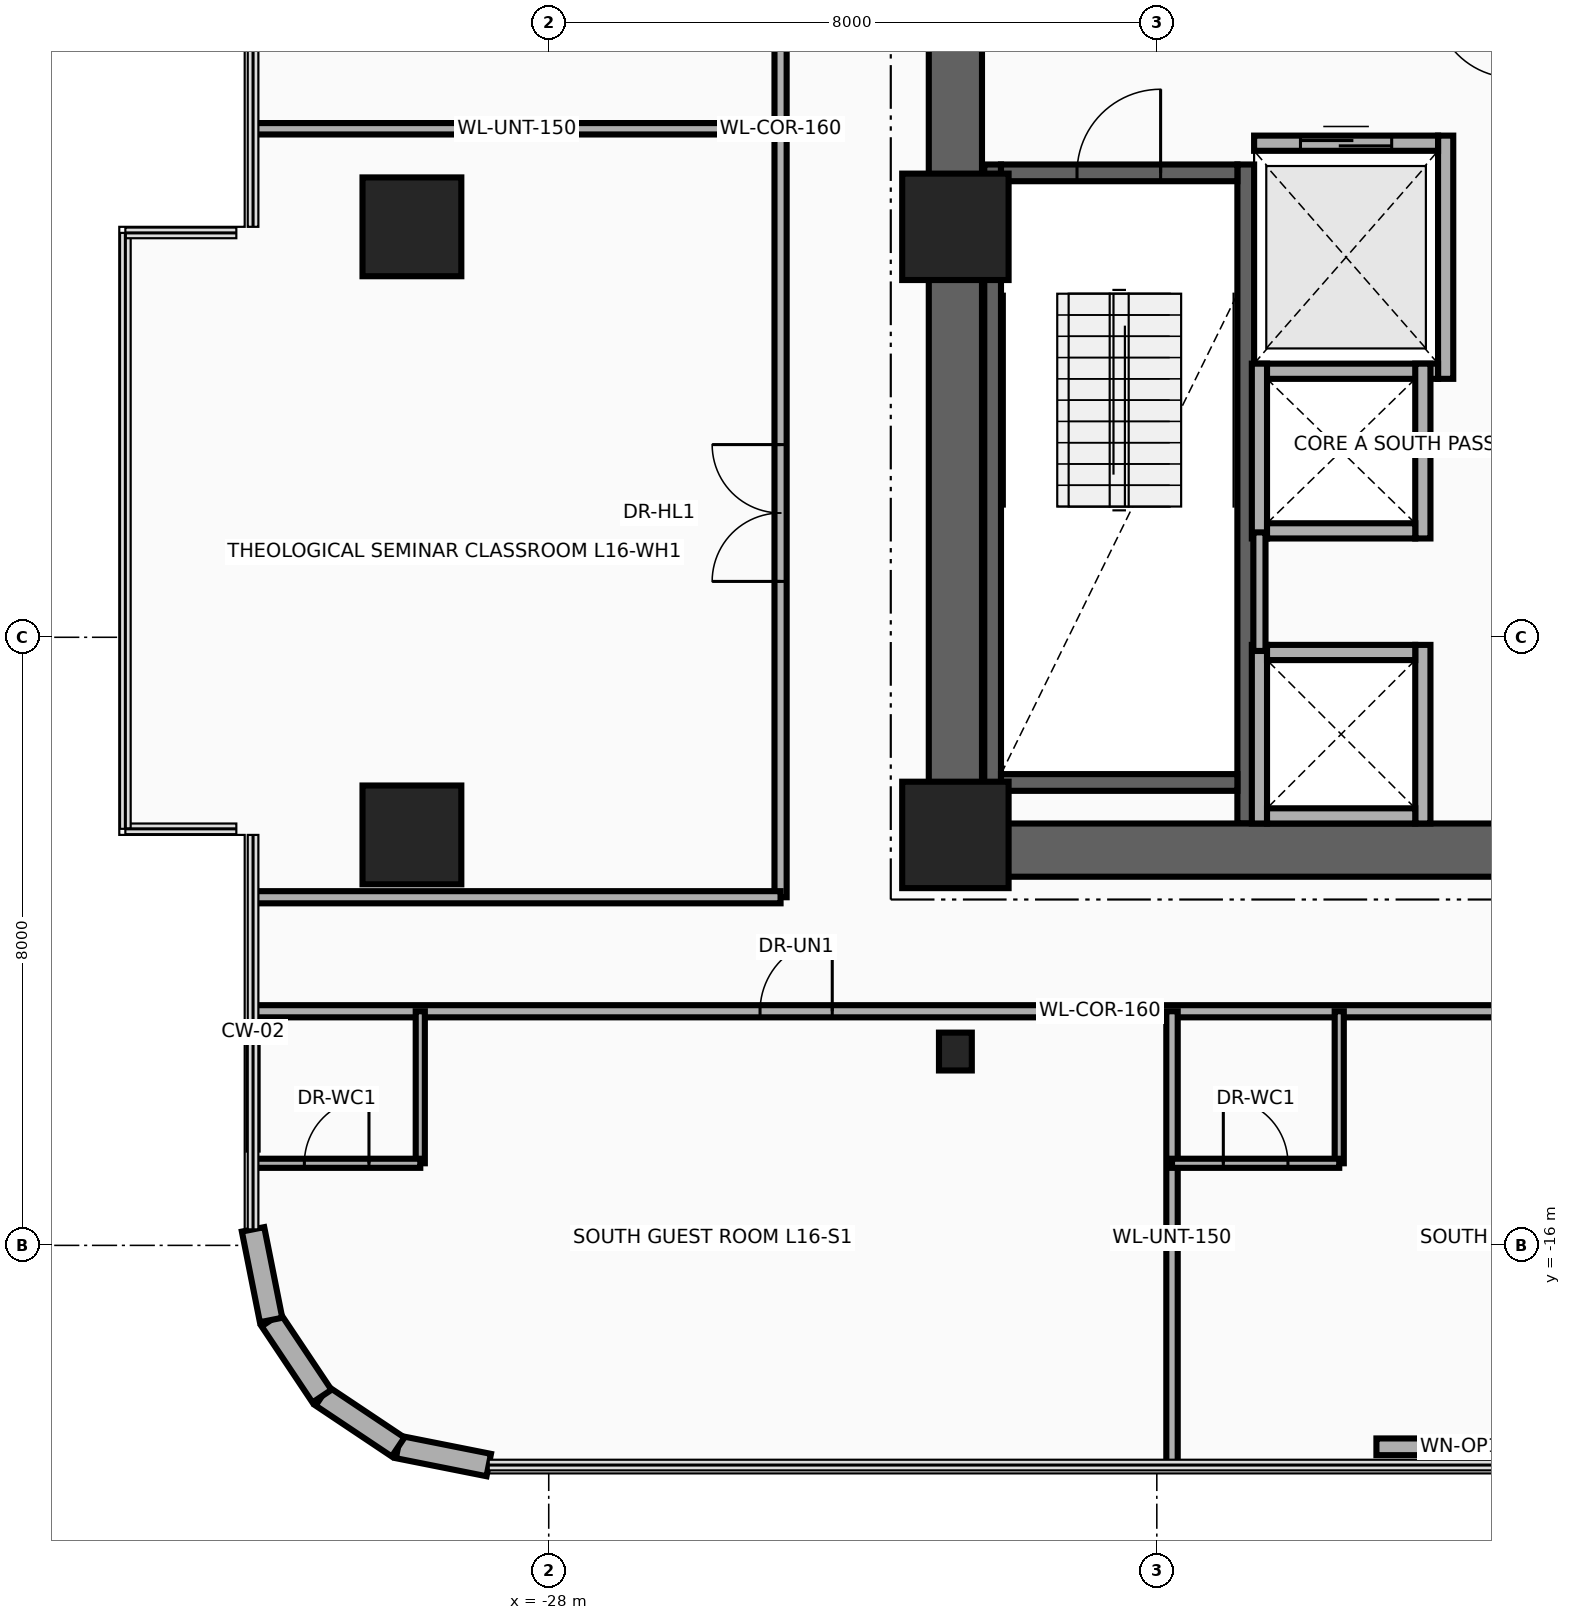
"""IFC4 building model, lengths in metres.
Left out: names, types, materials, properties, quantities, classifications, styles, units other than length and angle.
Written with IfcOpenShell. Run it as: python <this file> out.ifc"""

import sys

from ifc_helpers import new_model, si_unit, direction, frame, frame_2d, origin, origin_2d, place, context, subcontext, project, spatial, rectangle, circle, i_section, extrude, source, transform, mapped, element, fill, save


model = new_model("IFC4")
c1 = context("Model", 3, precision=1e-05, world=origin(), true_north=direction((0.0, 1.0)))
c2 = subcontext(c1, "Body", "Model", "MODEL_VIEW")
j1 = project(units=[si_unit("LENGTHUNIT", "METRE"), si_unit("PLANEANGLEUNIT", "RADIAN")], contexts=[c1])
p1 = place(None, origin())
s1 = spatial("IfcSite", under=j1, at=p1, CompositionType="ELEMENT")
p2 = place(p1, origin())
s2 = spatial("IfcBuilding", under=s1, at=p2, CompositionType="ELEMENT")
p3 = place(p2, frame((0.0, 0.0, 66.7)))
s3 = spatial("IfcBuildingStorey", under=s2, at=p3, CompositionType="ELEMENT", Elevation=66.7)
for number, where, z_axis, x_axis in (
    (1, (-22.16, -10.45, 0.0), (0.0, 0.0, 1.0), (0.0, 1.0, 0.0)),
    (2, (-18.83, -10.45, 0.0), (0.0, 0.0, 1.0), (0.0, 1.0, 0.0)),
):
    element("IfcWall", number, at=place(p3, frame(where, z_axis=z_axis, x_axis=x_axis)), inside=s3, PredefinedType="SHEAR", context=c2, shape_type="SweptSolid", body=[
        extrude(rectangle(XDim=8.67, YDim=0.22, at=frame_2d((4.335, 0.0))), origin(), (0.0, 0.0, 1.0), 3.46),
    ])
p4 = place(p3, frame((-22.05, -9.91, 0.0), z_axis=(0.0, 0.0, 1.0), x_axis=(1.0, 0.0, 0.0)))
e3 = element("IfcWall", 3, at=p4, inside=s3, PredefinedType="SHEAR", context=c2, shape_type="SweptSolid", body=[
    extrude(rectangle(XDim=3.11, YDim=0.22, at=frame_2d((1.555, 0.0))), origin(), (0.0, 0.0, 1.0), 3.46),
])
p5 = place(p3, frame((-22.05, -1.89, 0.0), z_axis=(0.0, 0.0, 1.0), x_axis=(1.0, 0.0, 0.0)))
e4 = element("IfcWall", 4, at=p5, inside=s3, PredefinedType="SHEAR", context=c2, shape_type="SweptSolid", body=[
    extrude(rectangle(XDim=3.11, YDim=0.22, at=frame_2d((1.555, 0.0))), origin(), (0.0, 0.0, 1.0), 3.46),
])
p6 = place(p5, frame((1.0, 0.0, 0.0)))
e5 = element("IfcOpeningElement", 5, at=p6, cuts=e4, PredefinedType="OPENING", context=c2, shape_type="SweptSolid", body=[
    extrude(rectangle(XDim=1.1, YDim=2.15, at=frame_2d((0.55, 1.075))), frame((0.0, 0.125, 0.0), z_axis=(0.0, -1.0, 0.0), x_axis=(1.0, 0.0, 0.0)), (0.0, 0.0, 1.0), 0.25),
])
p7 = place(p3, frame((-22.65, -11.15, 0.0), z_axis=(0.0, 0.0, 1.0), x_axis=(0.0, 1.0, 0.0)))
e6 = element("IfcWall", 6, at=p7, inside=s3, PredefinedType="SHEAR", context=c2, shape_type="SweptSolid", body=[
    extrude(rectangle(XDim=22.3, YDim=0.7, at=frame_2d((11.15, 0.0))), origin(), (0.0, 0.0, 1.0), 3.46),
])
p8 = place(p3, frame((-22.65, -10.8, 0.0), z_axis=(0.0, 0.0, 1.0), x_axis=(1.0, 0.0, 0.0)))
e7 = element("IfcWall", 7, at=p8, inside=s3, PredefinedType="SHEAR", context=c2, shape_type="SweptSolid", body=[
    extrude(rectangle(XDim=10.25, YDim=0.7, at=frame_2d((5.125, 0.0))), origin(), (0.0, 0.0, 1.0), 3.46),
])
m1 = source(origin(), c2, "Body", "SweptSolid", [
    extrude(circle(Radius=0.65, at=origin_2d()), origin(), (0.0, 0.0, 1.0), 3.7),
])
p9 = place(p3, frame((-29.8, -10.6, 0.0), z_axis=(0.0, 0.0, 1.0), x_axis=(1.0, 0.0, 0.0)))
e8 = element("IfcColumn", 8, at=p9, inside=s3, PredefinedType="COLUMN", context=c2, shape_type="MappedRepresentation", body=[
    mapped(m1, transform((0.0, 0.0, 0.0), x_axis=(1.0, 0.0, 0.0), y_axis=(0.0, 1.0, 0.0), z_axis=(0.0, 0.0, 1.0), scale=1.0)),
])
m2 = source(origin(), c2, "Body", "SweptSolid", [
    extrude(rectangle(XDim=1.4, YDim=1.4, at=origin_2d()), origin(), (0.0, 0.0, 1.0), 3.7),
])
p10 = place(p3, frame((-22.65, -10.6, 0.0), z_axis=(0.0, 0.0, 1.0), x_axis=(1.0, 0.0, 0.0)))
e9 = element("IfcColumn", 9, at=p10, inside=s3, PredefinedType="COLUMN", context=c2, shape_type="MappedRepresentation", body=[
    mapped(m2, transform((0.0, 0.0, 0.0), x_axis=(1.0, 0.0, 0.0), y_axis=(0.0, 1.0, 0.0), z_axis=(0.0, 0.0, 1.0), scale=1.0)),
])
p11 = place(p3, frame((-29.8, -2.6, 0.0), z_axis=(0.0, 0.0, 1.0), x_axis=(1.0, 0.0, 0.0)))
e10 = element("IfcColumn", 10, at=p11, inside=s3, PredefinedType="COLUMN", context=c2, shape_type="MappedRepresentation", body=[
    mapped(m1, transform((0.0, 0.0, 0.0), x_axis=(1.0, 0.0, 0.0), y_axis=(0.0, 1.0, 0.0), z_axis=(0.0, 0.0, 1.0), scale=1.0)),
])
p12 = place(p3, frame((-22.65, -2.6, 0.0), z_axis=(0.0, 0.0, 1.0), x_axis=(1.0, 0.0, 0.0)))
e11 = element("IfcColumn", 11, at=p12, inside=s3, PredefinedType="COLUMN", context=c2, shape_type="MappedRepresentation", body=[
    mapped(m2, transform((0.0, 0.0, 0.0), x_axis=(1.0, 0.0, 0.0), y_axis=(0.0, 1.0, 0.0), z_axis=(0.0, 0.0, 1.0), scale=1.0)),
])
m3 = source(origin(), c2, "Body", "SweptSolid", [
    extrude(i_section(OverallWidth=0.432, OverallDepth=0.498, WebThickness=0.056, FlangeThickness=0.089, at=origin_2d()), origin(), (0.0, 0.0, 1.0), 3.7),
])
p13 = place(p3, frame((-22.65, -13.45, 0.0), z_axis=(0.0, 0.0, 1.0), x_axis=(1.0, 0.0, 0.0)))
e12 = element("IfcColumn", 12, at=p13, inside=s3, PredefinedType="COLUMN", context=c2, shape_type="MappedRepresentation", body=[
    mapped(m3, transform((0.0, 0.0, 0.0), x_axis=(1.0, 0.0, 0.0), y_axis=(0.0, 1.0, 0.0), z_axis=(0.0, 0.0, 1.0), scale=1.0)),
])
p14 = place(p3, frame((-14.911, -18.65, 0.0), z_axis=(0.0, 0.0, 1.0), x_axis=(-1.0, 0.0, 0.0)))
e13 = element("IfcWall", 13, at=p14, inside=s3, PredefinedType="SOLIDWALL", context=c2, shape_type="SweptSolid", body=[
    extrude(rectangle(XDim=2.2, YDim=0.22, at=frame_2d((1.1, 0.0))), origin(), (0.0, 0.0, 1.0), 3.46),
])
p15 = place(p14, frame((0.65, 0.0, 0.95)))
e14 = element("IfcOpeningElement", 14, at=p15, cuts=e13, PredefinedType="OPENING", context=c2, shape_type="SweptSolid", body=[
    extrude(rectangle(XDim=0.9, YDim=1.3, at=frame_2d((0.45, 0.65))), frame((0.0, 0.125, 0.0), z_axis=(0.0, -1.0, 0.0), x_axis=(1.0, 0.0, 0.0)), (0.0, 0.0, 1.0), 0.25),
])
p16 = place(p3, frame((-28.789, -18.89, 0.0), z_axis=(0.0, 0.0, 1.0), x_axis=(-0.980804027463, 0.194996050505, 0.0)))
e15 = element("IfcWall", 15, at=p16, inside=s3, PredefinedType="SOLIDWALL", context=c2, shape_type="SweptSolid", body=[
    extrude(rectangle(XDim=1.216, YDim=0.3, at=frame_2d((0.608, 0.0))), origin(), (0.0, 0.0, 1.0), 3.46),
])
for number, where, z_axis, x_axis in (
    (16, (-29.982, -18.653, 0.0), (0.0, 0.0, 1.0), (-0.831, 0.556, 0.0)),
    (17, (-30.983, -17.983, 0.0), (0.0, 0.0, 1.0), (-0.556, 0.831, 0.0)),
):
    element("IfcWall", number, at=place(p3, frame(where, z_axis=z_axis, x_axis=x_axis)), inside=s3, PredefinedType="SOLIDWALL", context=c2, shape_type="SweptSolid", body=[
        extrude(rectangle(XDim=1.205, YDim=0.3, at=frame_2d((0.603, 0.0))), origin(), (0.0, 0.0, 1.0), 3.46),
    ])
p17 = place(p3, frame((-31.653, -16.982, 0.0), z_axis=(0.0, 0.0, 1.0), x_axis=(-0.194996050505, 0.980804027463, 0.0)))
e18 = element("IfcWall", 18, at=p17, inside=s3, PredefinedType="SOLIDWALL", context=c2, shape_type="SweptSolid", body=[
    extrude(rectangle(XDim=1.216, YDim=0.3, at=frame_2d((0.608, 0.0))), origin(), (0.0, 0.0, 1.0), 3.46),
])
p18 = place(p3, frame((-16.2, -4.6, 0.0), z_axis=(0.0, 0.0, 1.0), x_axis=(0.0, 1.0, 0.0)))
e19 = element("IfcWall", 19, at=p18, inside=s3, PredefinedType="MOVABLE", context=c2, shape_type="SweptSolid", body=[
    extrude(rectangle(XDim=3.2, YDim=0.2, at=frame_2d((1.6, 0.0))), origin(), (0.0, 0.0, 1.0), 3.46),
])
p19 = place(p3, frame((-18.72, -4.5, 0.0), z_axis=(0.0, 0.0, 1.0), x_axis=(1.0, 0.0, 0.0)))
e20 = element("IfcWall", 20, at=p19, inside=s3, PredefinedType="MOVABLE", context=c2, shape_type="SweptSolid", body=[
    extrude(rectangle(XDim=2.42, YDim=0.2, at=frame_2d((1.21, 0.0))), origin(), (0.0, 0.0, 1.0), 3.46),
])
p20 = place(p3, frame((-18.72, -1.5, 0.0), z_axis=(0.0, 0.0, 1.0), x_axis=(1.0, 0.0, 0.0)))
e21 = element("IfcWall", 21, at=p20, inside=s3, PredefinedType="MOVABLE", context=c2, shape_type="SweptSolid", body=[
    extrude(rectangle(XDim=2.42, YDim=0.2, at=frame_2d((1.21, 0.0))), origin(), (0.0, 0.0, 1.0), 3.46),
])
p21 = place(p20, frame((0.61, 0.0, 0.0)))
e22 = element("IfcOpeningElement", 22, at=p21, cuts=e21, PredefinedType="OPENING", context=c2, shape_type="SweptSolid", body=[
    extrude(rectangle(XDim=1.2, YDim=2.1, at=frame_2d((0.6, 1.05))), frame((0.0, 0.115, 0.0), z_axis=(0.0, -1.0, 0.0), x_axis=(1.0, 0.0, 0.0)), (0.0, 0.0, 1.0), 0.23),
])
for number, where, z_axis, x_axis in (
    (23, (-18.65, -10.45, 0.0), (0.0, 0.0, 1.0), (0.0, 1.0, 0.0)),
    (24, (-16.5, -10.45, 0.0), (0.0, 0.0, 1.0), (0.0, 1.0, 0.0)),
):
    element("IfcWall", number, at=place(p3, frame(where, z_axis=z_axis, x_axis=x_axis)), inside=s3, PredefinedType="MOVABLE", context=c2, shape_type="SweptSolid", body=[
        extrude(rectangle(XDim=2.35, YDim=0.2, at=frame_2d((1.175, 0.0))), origin(), (0.0, 0.0, 1.0), 2.583),
    ])
p22 = place(p3, frame((-18.55, -10.35, 0.0), z_axis=(0.0, 0.0, 1.0), x_axis=(1.0, 0.0, 0.0)))
e25 = element("IfcWall", 25, at=p22, inside=s3, PredefinedType="MOVABLE", context=c2, shape_type="SweptSolid", body=[
    extrude(rectangle(XDim=1.95, YDim=0.2, at=frame_2d((0.975, 0.0))), origin(), (0.0, 0.0, 1.0), 2.583),
])
p23 = place(p3, frame((-18.55, -8.2, 0.0), z_axis=(0.0, 0.0, 1.0), x_axis=(1.0, 0.0, 0.0)))
e26 = element("IfcWall", 26, at=p23, inside=s3, PredefinedType="MOVABLE", context=c2, shape_type="SweptSolid", body=[
    extrude(rectangle(XDim=1.95, YDim=0.2, at=frame_2d((0.975, 0.0))), origin(), (0.0, 0.0, 1.0), 3.46),
])
for number, where, z_axis, x_axis in (
    (27, (-18.65, -6.7, 0.0), (0.0, 0.0, 1.0), (0.0, 1.0, 0.0)),
    (28, (-16.5, -6.7, 0.0), (0.0, 0.0, 1.0), (0.0, 1.0, 0.0)),
):
    element("IfcWall", number, at=place(p3, frame(where, z_axis=z_axis, x_axis=x_axis)), inside=s3, PredefinedType="MOVABLE", context=c2, shape_type="SweptSolid", body=[
        extrude(rectangle(XDim=2.3, YDim=0.2, at=frame_2d((1.15, 0.0))), origin(), (0.0, 0.0, 1.0), 3.46),
    ])
p24 = place(p3, frame((-18.55, -6.6, 0.0), z_axis=(0.0, 0.0, 1.0), x_axis=(1.0, 0.0, 0.0)))
e29 = element("IfcWall", 29, at=p24, inside=s3, PredefinedType="MOVABLE", context=c2, shape_type="SweptSolid", body=[
    extrude(rectangle(XDim=1.95, YDim=0.2, at=frame_2d((0.975, 0.0))), origin(), (0.0, 0.0, 1.0), 3.46),
])
p25 = place(p3, frame((-18.65, -8.18, 0.0), z_axis=(0.0, 0.0, 1.0), x_axis=(0.0, 1.0, 0.0)))
e30 = element("IfcWall", 30, at=p25, inside=s3, PredefinedType="PARTITIONING", context=c2, shape_type="SweptSolid", body=[
    extrude(rectangle(XDim=1.56, YDim=0.16, at=frame_2d((0.78, 0.0))), origin(), (0.0, 0.0, 1.0), 3.46),
])
p26 = place(p3, frame((-24.95, -11.42, 0.0), z_axis=(0.0, 0.0, 1.0), x_axis=(0.0, 1.0, 0.0)))
e31 = element("IfcWall", 31, at=p26, inside=s3, PredefinedType="PARTITIONING", context=c2, shape_type="SweptSolid", body=[
    extrude(rectangle(XDim=20.22, YDim=0.16, at=frame_2d((10.11, 0.0))), origin(), (0.0, 0.0, 1.0), 2.583),
])
p27 = place(p26, frame((4.155, 0.0, 0.0)))
e32 = element("IfcOpeningElement", 32, at=p27, cuts=e31, PredefinedType="OPENING", context=c2, shape_type="SweptSolid", body=[
    extrude(rectangle(XDim=1.8, YDim=2.15, at=frame_2d((0.9, 1.075))), frame((0.0, 0.095, 0.0), z_axis=(0.0, -1.0, 0.0), x_axis=(1.0, 0.0, 0.0)), (0.0, 0.0, 1.0), 0.19),
])
p28 = place(p26, frame((14.265, 0.0, 0.0)))
e33 = element("IfcOpeningElement", 33, at=p28, cuts=e31, PredefinedType="OPENING", context=c2, shape_type="SweptSolid", body=[
    extrude(rectangle(XDim=1.8, YDim=2.15, at=frame_2d((0.9, 1.075))), frame((0.0, 0.095, 0.0), z_axis=(0.0, -1.0, 0.0), x_axis=(1.0, 0.0, 0.0)), (0.0, 0.0, 1.0), 0.19),
])
p29 = place(p3, frame((-31.89, -1.31, 0.0), z_axis=(0.0, 0.0, 1.0), x_axis=(1.0, 0.0, 0.0)))
e34 = element("IfcWall", 34, at=p29, inside=s3, PredefinedType="PARTITIONING", context=c2, shape_type="SweptSolid", body=[
    extrude(rectangle(XDim=6.94, YDim=0.15, at=frame_2d((3.47, 0.0))), origin(), (0.0, 0.0, 1.0), 2.896),
])
p30 = place(p3, frame((-31.89, -12.92, 0.0), z_axis=(0.0, 0.0, 1.0), x_axis=(1.0, 0.0, 0.0)))
e35 = element("IfcWall", 35, at=p30, inside=s3, PredefinedType="PARTITIONING", context=c2, shape_type="SweptSolid", body=[
    extrude(rectangle(XDim=22.28, YDim=0.16, at=frame_2d((11.14, 0.0))), origin(), (0.0, 0.0, 1.0), 2.834),
])
p31 = place(p30, frame((6.67, 0.0, 0.0)))
e36 = element("IfcOpeningElement", 36, at=p31, cuts=e35, PredefinedType="OPENING", context=c2, shape_type="SweptSolid", body=[
    extrude(rectangle(XDim=0.95, YDim=2.15, at=frame_2d((0.475, 1.075))), frame((0.0, 0.095, 0.0), z_axis=(0.0, -1.0, 0.0), x_axis=(1.0, 0.0, 0.0)), (0.0, 0.0, 1.0), 0.19),
])
p32 = place(p30, frame((17.81, 0.0, 0.0)))
e37 = element("IfcOpeningElement", 37, at=p32, cuts=e35, PredefinedType="OPENING", context=c2, shape_type="SweptSolid", body=[
    extrude(rectangle(XDim=0.95, YDim=2.15, at=frame_2d((0.475, 1.075))), frame((0.0, 0.095, 0.0), z_axis=(0.0, -1.0, 0.0), x_axis=(1.0, 0.0, 0.0)), (0.0, 0.0, 1.0), 0.19),
])
p33 = place(p3, frame((-19.8, -18.89, 0.0), z_axis=(0.0, 0.0, 1.0), x_axis=(0.0, 1.0, 0.0)))
e38 = element("IfcWall", 38, at=p33, inside=s3, PredefinedType="PARTITIONING", context=c2, shape_type="SweptSolid", body=[
    extrude(rectangle(XDim=5.97, YDim=0.15, at=frame_2d((2.985, 0.0))), origin(), (0.0, 0.0, 1.0), 2.896),
])
p34 = place(p3, frame((-29.69, -14.92, 0.0), z_axis=(0.0, 0.0, 1.0), x_axis=(0.0, 1.0, 0.0)))
e39 = element("IfcWall", 39, at=p34, inside=s3, PredefinedType="PARTITIONING", context=c2, shape_type="SweptSolid", body=[
    extrude(rectangle(XDim=2.0, YDim=0.12, at=frame_2d((1.0, 0.0))), origin(), (0.0, 0.0, 1.0), 3.46),
])
p35 = place(p3, frame((-31.89, -14.92, 0.0), z_axis=(0.0, 0.0, 1.0), x_axis=(1.0, 0.0, 0.0)))
e40 = element("IfcWall", 40, at=p35, inside=s3, PredefinedType="PARTITIONING", context=c2, shape_type="SweptSolid", body=[
    extrude(rectangle(XDim=2.2, YDim=0.12, at=frame_2d((1.1, 0.0))), origin(), (0.0, 0.0, 1.0), 3.46),
])
p36 = place(p35, frame((0.675, 0.0, 0.0)))
e41 = element("IfcOpeningElement", 41, at=p36, cuts=e40, PredefinedType="OPENING", context=c2, shape_type="SweptSolid", body=[
    extrude(rectangle(XDim=0.85, YDim=2.1, at=frame_2d((0.425, 1.05))), frame((0.0, 0.075, 0.0), z_axis=(0.0, -1.0, 0.0), x_axis=(1.0, 0.0, 0.0)), (0.0, 0.0, 1.0), 0.15),
])
p37 = place(p3, frame((-31.89, -14.74, 0.0), z_axis=(0.0, 0.0, 1.0), x_axis=(0.0, 1.0, 0.0)))
e42 = element("IfcWall", 42, at=p37, inside=s3, PredefinedType="PARTITIONING", context=c2, shape_type="SweptSolid", body=[
    extrude(rectangle(XDim=1.62, YDim=0.12, at=frame_2d((0.81, 0.0))), origin(), (0.0, 0.0, 1.0), 3.46),
])
p38 = place(p3, frame((-17.6, -14.92, 0.0), z_axis=(0.0, 0.0, 1.0), x_axis=(0.0, 1.0, 0.0)))
e43 = element("IfcWall", 43, at=p38, inside=s3, PredefinedType="PARTITIONING", context=c2, shape_type="SweptSolid", body=[
    extrude(rectangle(XDim=2.0, YDim=0.12, at=frame_2d((1.0, 0.0))), origin(), (0.0, 0.0, 1.0), 2.896),
])
p39 = place(p3, frame((-19.8, -14.92, 0.0), z_axis=(0.0, 0.0, 1.0), x_axis=(1.0, 0.0, 0.0)))
e44 = element("IfcWall", 44, at=p39, inside=s3, PredefinedType="PARTITIONING", context=c2, shape_type="SweptSolid", body=[
    extrude(rectangle(XDim=2.2, YDim=0.12, at=frame_2d((1.1, 0.0))), origin(), (0.0, 0.0, 1.0), 3.46),
])
p40 = place(p39, frame((0.675, 0.0, 0.0)))
e45 = element("IfcOpeningElement", 45, at=p40, cuts=e44, PredefinedType="OPENING", context=c2, shape_type="SweptSolid", body=[
    extrude(rectangle(XDim=0.85, YDim=2.1, at=frame_2d((0.425, 1.05))), frame((0.0, 0.075, 0.0), z_axis=(0.0, -1.0, 0.0), x_axis=(1.0, 0.0, 0.0)), (0.0, 0.0, 1.0), 0.15),
])
p41 = place(p3, frame((-31.89, -11.42, 0.0), z_axis=(0.0, 0.0, 1.0), x_axis=(1.0, 0.0, 0.0)))
e46 = element("IfcWall", 46, at=p41, inside=s3, PredefinedType="PARTITIONING", context=c2, shape_type="SweptSolid", body=[
    extrude(rectangle(XDim=6.94, YDim=0.16, at=frame_2d((3.47, 0.0))), origin(), (0.0, 0.0, 1.0), 3.46),
])
p42 = place(p15, origin())
e47 = element("IfcWindow", 47, at=p42, inside=s3, PartitioningType="SINGLE_PANEL", PredefinedType="WINDOW", context=c2, shape_type="SweptSolid", body=[
    extrude(rectangle(XDim=0.9, YDim=1.3, at=frame_2d((0.45, 0.65))), frame((0.0, 0.03, 0.0), z_axis=(0.0, -1.0, 0.0), x_axis=(1.0, 0.0, 0.0)), (0.0, 0.0, 1.0), 0.06),
])
fill(e14, e47)
p43 = place(p21, origin())
e48 = element("IfcDoor", 48, at=p43, inside=s3, OperationType="DOUBLE_DOOR_SLIDING", PredefinedType="DOOR", context=c2, shape_type="SweptSolid", body=[
    extrude(rectangle(XDim=1.2, YDim=2.1, at=frame_2d((0.6, 1.05))), frame((0.0, 0.025, 0.0), z_axis=(0.0, -1.0, 0.0), x_axis=(1.0, 0.0, 0.0)), (0.0, 0.0, 1.0), 0.05),
])
fill(e22, e48)
p44 = place(p6, origin())
e49 = element("IfcDoor", 49, at=p44, inside=s3, OperationType="SINGLE_SWING_RIGHT", PredefinedType="DOOR", context=c2, shape_type="SweptSolid", body=[
    extrude(rectangle(XDim=1.1, YDim=2.15, at=frame_2d((0.55, 1.075))), frame((0.0, 0.025, 0.0), z_axis=(0.0, -1.0, 0.0), x_axis=(1.0, 0.0, 0.0)), (0.0, 0.0, 1.0), 0.05),
])
fill(e5, e49)
p45 = place(p27, origin())
e50 = element("IfcDoor", 50, at=p45, inside=s3, OperationType="DOUBLE_DOOR_SINGLE_SWING", PredefinedType="DOOR", context=c2, shape_type="SweptSolid", body=[
    extrude(rectangle(XDim=1.8, YDim=2.15, at=frame_2d((0.9, 1.075))), frame((0.0, 0.025, 0.0), z_axis=(0.0, -1.0, 0.0), x_axis=(1.0, 0.0, 0.0)), (0.0, 0.0, 1.0), 0.05),
])
fill(e32, e50)
p46 = place(p31, origin())
e51 = element("IfcDoor", 51, at=p46, inside=s3, OperationType="SINGLE_SWING_RIGHT", PredefinedType="DOOR", context=c2, shape_type="SweptSolid", body=[
    extrude(rectangle(XDim=0.95, YDim=2.15, at=frame_2d((0.475, 1.075))), frame((0.0, 0.025, 0.0), z_axis=(0.0, -1.0, 0.0), x_axis=(1.0, 0.0, 0.0)), (0.0, 0.0, 1.0), 0.05),
])
fill(e36, e51)
p47 = place(p36, origin())
e52 = element("IfcDoor", 52, at=p47, inside=s3, OperationType="SINGLE_SWING_LEFT", PredefinedType="DOOR", context=c2, shape_type="SweptSolid", body=[
    extrude(rectangle(XDim=0.85, YDim=2.1, at=frame_2d((0.425, 1.05))), frame((0.0, 0.025, 0.0), z_axis=(0.0, -1.0, 0.0), x_axis=(1.0, 0.0, 0.0)), (0.0, 0.0, 1.0), 0.05),
])
fill(e41, e52)
p48 = place(p40, origin())
e53 = element("IfcDoor", 53, at=p48, inside=s3, OperationType="SINGLE_SWING_LEFT", PredefinedType="DOOR", context=c2, shape_type="SweptSolid", body=[
    extrude(rectangle(XDim=0.85, YDim=2.1, at=frame_2d((0.425, 1.05))), frame((0.0, 0.025, 0.0), z_axis=(0.0, -1.0, 0.0), x_axis=(1.0, 0.0, 0.0)), (0.0, 0.0, 1.0), 0.05),
])
fill(e45, e53)
save(model, sys.argv[1])
